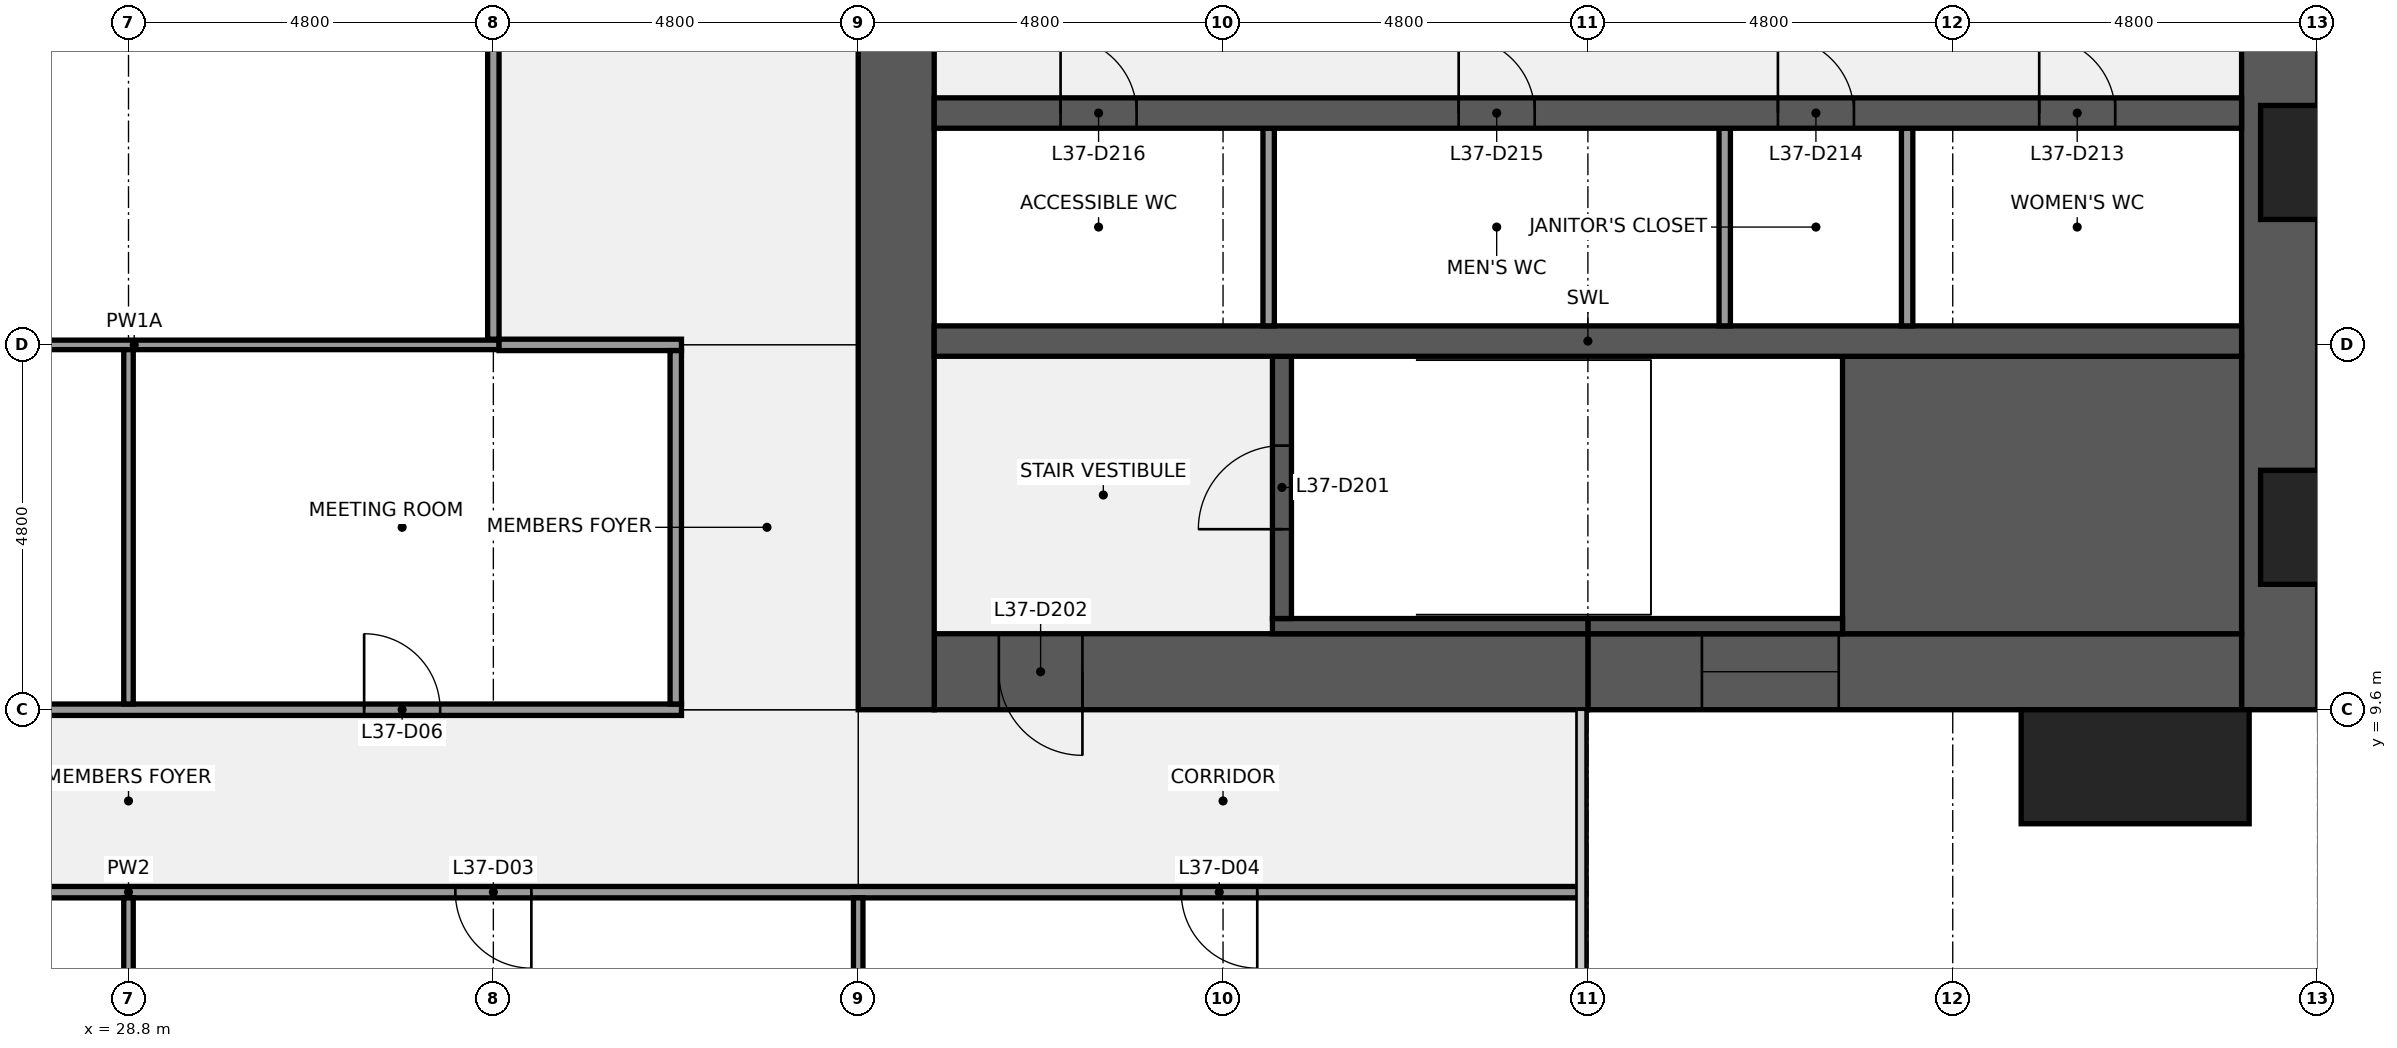
"""IFC4 building model, lengths in metres.
Left out: names, types, materials, properties, quantities, classifications, styles, units other than length and angle.
Written with IfcOpenShell. Run it as: python <this file> out.ifc"""

import sys

from ifc_helpers import new_model, si_unit, direction, frame, frame_2d, origin, origin_2d, place, context, subcontext, project, spatial, rectangle, extrude, element, fill, save


model = new_model("IFC4")
c1 = context("Model", 3, precision=1e-05, world=origin(), true_north=direction((0.0, 1.0)))
c2 = subcontext(c1, "Body", "Model", "MODEL_VIEW")
j1 = project(units=[si_unit("LENGTHUNIT", "METRE"), si_unit("PLANEANGLEUNIT", "RADIAN")], contexts=[c1])
p1 = place(None, origin())
s1 = spatial("IfcSite", under=j1, at=p1, CompositionType="ELEMENT")
p2 = place(p1, origin())
s2 = spatial("IfcBuilding", under=s1, at=p2, CompositionType="ELEMENT")
p3 = place(p2, frame((0.0, 0.0, 168.1)))
s3 = spatial("IfcBuildingStorey", under=s2, at=p3, CompositionType="ELEMENT", Elevation=168.1)
p4 = place(p3, frame((57.1, 38.4, 0.0), z_axis=(0.0, 0.0, 1.0), x_axis=(0.0, -1.0, 0.0)))
e1 = element("IfcWall", 1, at=p4, inside=s3, PredefinedType="SHEAR", context=c2, shape_type="SweptSolid", body=[
    extrude(rectangle(XDim=28.8, YDim=1.0, at=frame_2d((14.4, 0.0))), origin(), (0.0, 0.0, 1.0), 3.84),
])
p5 = place(p4, frame((18.45, 0.0, 0.9)))
e2 = element("IfcOpeningElement", 2, at=p5, cuts=e1, PredefinedType="OPENING", context=c2, shape_type="SweptSolid", body=[
    extrude(rectangle(XDim=1.5, YDim=1.5, at=frame_2d((0.75, 0.75))), frame((0.0, 0.51, 0.0), z_axis=(0.0, -1.0, 0.0), x_axis=(1.0, 0.0, 0.0)), (0.0, 0.0, 1.0), 1.02),
])
p6 = place(p4, frame((8.85, 0.0, 0.9)))
e3 = element("IfcOpeningElement", 3, at=p6, cuts=e1, PredefinedType="OPENING", context=c2, shape_type="SweptSolid", body=[
    extrude(rectangle(XDim=1.5, YDim=1.5, at=frame_2d((0.75, 0.75))), frame((0.0, 0.51, 0.0), z_axis=(0.0, -1.0, 0.0), x_axis=(1.0, 0.0, 0.0)), (0.0, 0.0, 1.0), 1.02),
])
p7 = place(p3, frame((56.6, 10.1, 0.0), z_axis=(0.0, 0.0, 1.0), x_axis=(-1.0, 0.0, 0.0)))
e4 = element("IfcWall", 4, at=p7, inside=s3, PredefinedType="SHEAR", context=c2, shape_type="SweptSolid", body=[
    extrude(rectangle(XDim=8.6, YDim=1.0, at=frame_2d((4.3, 0.0))), origin(), (0.0, 0.0, 1.0), 3.84),
])
p8 = place(p7, frame((5.3, 0.0, 0.9)))
e5 = element("IfcOpeningElement", 5, at=p8, cuts=e4, PredefinedType="OPENING", context=c2, shape_type="SweptSolid", body=[
    extrude(rectangle(XDim=1.8, YDim=1.5, at=frame_2d((0.9, 0.75))), frame((0.0, 0.51, 0.0), z_axis=(0.0, -1.0, 0.0), x_axis=(1.0, 0.0, 0.0)), (0.0, 0.0, 1.0), 1.02),
])
p9 = place(p3, frame((48.0, 10.1, 0.0), z_axis=(0.0, 0.0, 1.0), x_axis=(-1.0, 0.0, 0.0)))
e6 = element("IfcWall", 6, at=p9, inside=s3, PredefinedType="SHEAR", context=c2, shape_type="SweptSolid", body=[
    extrude(rectangle(XDim=8.6, YDim=1.0, at=frame_2d((4.3, 0.0))), origin(), (0.0, 0.0, 1.0), 3.84),
])
p10 = place(p9, frame((6.65, 0.0, 0.0)))
e7 = element("IfcOpeningElement", 7, at=p10, cuts=e6, PredefinedType="OPENING", context=c2, shape_type="SweptSolid", body=[
    extrude(rectangle(XDim=1.1, YDim=2.1, at=frame_2d((0.55, 1.05))), frame((0.0, 0.51, 0.0), z_axis=(0.0, -1.0, 0.0), x_axis=(1.0, 0.0, 0.0)), (0.0, 0.0, 1.0), 1.02),
])
p11 = place(p3, frame((38.9, 9.6, 0.0), z_axis=(0.0, 0.0, 1.0), x_axis=(0.0, 1.0, 0.0)))
e8 = element("IfcWall", 8, at=p11, inside=s3, PredefinedType="SHEAR", context=c2, shape_type="SweptSolid", body=[
    extrude(rectangle(XDim=28.8, YDim=1.0, at=frame_2d((14.4, 0.0))), origin(), (0.0, 0.0, 1.0), 3.84),
])
p12 = place(p11, frame((8.7, 0.0, 0.0)))
e9 = element("IfcOpeningElement", 9, at=p12, cuts=e8, PredefinedType="OPENING", context=c2, shape_type="SweptSolid", body=[
    extrude(rectangle(XDim=1.8, YDim=2.1, at=frame_2d((0.9, 1.05))), frame((0.0, 0.51, 0.0), z_axis=(0.0, -1.0, 0.0), x_axis=(1.0, 0.0, 0.0)), (0.0, 0.0, 1.0), 1.02),
])
p13 = place(p11, frame((18.3, 0.0, 0.0)))
e10 = element("IfcOpeningElement", 10, at=p13, cuts=e8, PredefinedType="OPENING", context=c2, shape_type="SweptSolid", body=[
    extrude(rectangle(XDim=1.8, YDim=2.1, at=frame_2d((0.9, 1.05))), frame((0.0, 0.51, 0.0), z_axis=(0.0, -1.0, 0.0), x_axis=(1.0, 0.0, 0.0)), (0.0, 0.0, 1.0), 1.02),
])
p14 = place(p3, frame((51.35, 12.425, 0.0), z_axis=(0.0, 0.0, 1.0), x_axis=(1.0, 0.0, 0.0)))
e11 = element("IfcWall", 11, at=p14, inside=s3, PredefinedType="SHEAR", context=c2, shape_type="SweptSolid", body=[
    extrude(rectangle(XDim=5.25, YDim=3.65, at=frame_2d((2.625, 0.0))), origin(), (0.0, 0.0, 1.0), 3.84),
])
p15 = place(p3, frame((48.0, 10.7, 0.0), z_axis=(0.0, 0.0, 1.0), x_axis=(1.0, 0.0, 0.0)))
e12 = element("IfcWall", 12, at=p15, inside=s3, PredefinedType="SHEAR", context=c2, shape_type="SweptSolid", body=[
    extrude(rectangle(XDim=3.35, YDim=0.2, at=frame_2d((1.675, 0.0))), origin(), (0.0, 0.0, 1.0), 3.84),
])
p16 = place(p3, frame((43.85, 10.7, 0.0), z_axis=(0.0, 0.0, 1.0), x_axis=(1.0, 0.0, 0.0)))
e13 = element("IfcWall", 13, at=p16, inside=s3, PredefinedType="SHEAR", context=c2, shape_type="SweptSolid", body=[
    extrude(rectangle(XDim=4.15, YDim=0.2, at=frame_2d((2.075, 0.0))), origin(), (0.0, 0.0, 1.0), 3.84),
])
p17 = place(p3, frame((43.975, 10.8, 0.0), z_axis=(0.0, 0.0, 1.0), x_axis=(0.0, 1.0, 0.0)))
e14 = element("IfcWall", 14, at=p17, inside=s3, PredefinedType="SHEAR", context=c2, shape_type="SweptSolid", body=[
    extrude(rectangle(XDim=3.45, YDim=0.25, at=frame_2d((1.725, 0.0))), origin(), (0.0, 0.0, 1.0), 3.84),
])
p18 = place(p17, frame((1.175, 0.0, 0.0)))
e15 = element("IfcOpeningElement", 15, at=p18, cuts=e14, PredefinedType="OPENING", context=c2, shape_type="SweptSolid", body=[
    extrude(rectangle(XDim=1.1, YDim=2.1, at=frame_2d((0.55, 1.05))), frame((0.0, 0.135, 0.0), z_axis=(0.0, -1.0, 0.0), x_axis=(1.0, 0.0, 0.0)), (0.0, 0.0, 1.0), 0.27),
])
p19 = place(p3, frame((39.4, 14.45, 0.0), z_axis=(0.0, 0.0, 1.0), x_axis=(1.0, 0.0, 0.0)))
e16 = element("IfcWall", 16, at=p19, inside=s3, PredefinedType="SHEAR", context=c2, shape_type="SweptSolid", body=[
    extrude(rectangle(XDim=17.2, YDim=0.4, at=frame_2d((8.6, 0.0))), origin(), (0.0, 0.0, 1.0), 3.84),
])
for number, where, z_axis, x_axis in (
    (17, (52.2, 14.65, 0.0), (0.0, 0.0, 1.0), (0.0, 1.0, 0.0)),
    (18, (49.8, 14.65, 0.0), (0.0, 0.0, 1.0), (0.0, 1.0, 0.0)),
    (19, (43.8, 14.65, 0.0), (0.0, 0.0, 1.0), (0.0, 1.0, 0.0)),
):
    element("IfcWall", number, at=place(p3, frame(where, z_axis=z_axis, x_axis=x_axis)), inside=s3, PredefinedType="PARTITIONING", context=c2, shape_type="SweptSolid", body=[
        extrude(rectangle(XDim=2.6, YDim=0.15, at=frame_2d((1.3, 0.0))), origin(), (0.0, 0.0, 1.0), 3.84),
    ])
p20 = place(p3, frame((39.4, 17.45, 0.0), z_axis=(0.0, 0.0, 1.0), x_axis=(1.0, 0.0, 0.0)))
e20 = element("IfcWall", 20, at=p20, inside=s3, PredefinedType="SHEAR", context=c2, shape_type="SweptSolid", body=[
    extrude(rectangle(XDim=17.2, YDim=0.4, at=frame_2d((8.6, 0.0))), origin(), (0.0, 0.0, 1.0), 3.84),
])
p21 = place(p20, frame((14.538, 0.0, 0.0)))
e21 = element("IfcOpeningElement", 21, at=p21, cuts=e20, PredefinedType="OPENING", context=c2, shape_type="SweptSolid", body=[
    extrude(rectangle(XDim=1.0, YDim=2.1, at=frame_2d((0.5, 1.05))), frame((0.0, 0.21, 0.0), z_axis=(0.0, -1.0, 0.0), x_axis=(1.0, 0.0, 0.0)), (0.0, 0.0, 1.0), 0.42),
])
p22 = place(p20, frame((11.1, 0.0, 0.0)))
e22 = element("IfcOpeningElement", 22, at=p22, cuts=e20, PredefinedType="OPENING", context=c2, shape_type="SweptSolid", body=[
    extrude(rectangle(XDim=1.0, YDim=2.1, at=frame_2d((0.5, 1.05))), frame((0.0, 0.21, 0.0), z_axis=(0.0, -1.0, 0.0), x_axis=(1.0, 0.0, 0.0)), (0.0, 0.0, 1.0), 0.42),
])
p23 = place(p20, frame((6.9, 0.0, 0.0)))
e23 = element("IfcOpeningElement", 23, at=p23, cuts=e20, PredefinedType="OPENING", context=c2, shape_type="SweptSolid", body=[
    extrude(rectangle(XDim=1.0, YDim=2.1, at=frame_2d((0.5, 1.05))), frame((0.0, 0.21, 0.0), z_axis=(0.0, -1.0, 0.0), x_axis=(1.0, 0.0, 0.0)), (0.0, 0.0, 1.0), 0.42),
])
p24 = place(p20, frame((1.663, 0.0, 0.0)))
e24 = element("IfcOpeningElement", 24, at=p24, cuts=e20, PredefinedType="OPENING", context=c2, shape_type="SweptSolid", body=[
    extrude(rectangle(XDim=1.0, YDim=2.1, at=frame_2d((0.5, 1.05))), frame((0.0, 0.21, 0.0), z_axis=(0.0, -1.0, 0.0), x_axis=(1.0, 0.0, 0.0)), (0.0, 0.0, 1.0), 0.42),
])
p25 = place(p3, frame((9.7, 7.2, 0.0), z_axis=(0.0, 0.0, 1.0), x_axis=(1.0, 0.0, 0.0)))
e25 = element("IfcWall", 25, at=p25, inside=s3, PredefinedType="PARTITIONING", context=c2, shape_type="SweptSolid", body=[
    extrude(rectangle(XDim=38.2, YDim=0.15, at=frame_2d((19.1, 0.0))), origin(), (0.0, 0.0, 1.0), 2.936),
])
p26 = place(p25, frame((4.25, 0.0, 0.0)))
e26 = element("IfcOpeningElement", 26, at=p26, cuts=e25, PredefinedType="OPENING", context=c2, shape_type="SweptSolid", body=[
    extrude(rectangle(XDim=1.0, YDim=2.1, at=frame_2d((0.5, 1.05))), frame((0.0, 0.085, 0.0), z_axis=(0.0, -1.0, 0.0), x_axis=(1.0, 0.0, 0.0)), (0.0, 0.0, 1.0), 0.17),
])
p27 = place(p25, frame((13.8, 0.0, 0.0)))
e27 = element("IfcOpeningElement", 27, at=p27, cuts=e25, PredefinedType="OPENING", context=c2, shape_type="SweptSolid", body=[
    extrude(rectangle(XDim=1.0, YDim=2.1, at=frame_2d((0.5, 1.05))), frame((0.0, 0.085, 0.0), z_axis=(0.0, -1.0, 0.0), x_axis=(1.0, 0.0, 0.0)), (0.0, 0.0, 1.0), 0.17),
])
p28 = place(p25, frame((23.4, 0.0, 0.0)))
e28 = element("IfcOpeningElement", 28, at=p28, cuts=e25, PredefinedType="OPENING", context=c2, shape_type="SweptSolid", body=[
    extrude(rectangle(XDim=1.0, YDim=2.1, at=frame_2d((0.5, 1.05))), frame((0.0, 0.085, 0.0), z_axis=(0.0, -1.0, 0.0), x_axis=(1.0, 0.0, 0.0)), (0.0, 0.0, 1.0), 0.17),
])
p29 = place(p25, frame((32.95, 0.0, 0.0)))
e29 = element("IfcOpeningElement", 29, at=p29, cuts=e25, PredefinedType="OPENING", context=c2, shape_type="SweptSolid", body=[
    extrude(rectangle(XDim=1.0, YDim=2.1, at=frame_2d((0.5, 1.05))), frame((0.0, 0.085, 0.0), z_axis=(0.0, -1.0, 0.0), x_axis=(1.0, 0.0, 0.0)), (0.0, 0.0, 1.0), 0.17),
])
p30 = place(p3, frame((21.525, 9.6, 0.0), z_axis=(0.0, 0.0, 1.0), x_axis=(1.0, 0.0, 0.0)))
e30 = element("IfcWall", 30, at=p30, inside=s3, PredefinedType="PARTITIONING", context=c2, shape_type="SweptSolid", body=[
    extrude(rectangle(XDim=14.55, YDim=0.15, at=frame_2d((7.275, 0.0))), origin(), (0.0, 0.0, 1.0), 2.936),
])
p31 = place(p30, frame((3.175, 0.0, 0.0)))
e31 = element("IfcOpeningElement", 31, at=p31, cuts=e30, PredefinedType="OPENING", context=c2, shape_type="SweptSolid", body=[
    extrude(rectangle(XDim=1.0, YDim=2.1, at=frame_2d((0.5, 1.05))), frame((0.0, 0.085, 0.0), z_axis=(0.0, -1.0, 0.0), x_axis=(1.0, 0.0, 0.0)), (0.0, 0.0, 1.0), 0.17),
])
p32 = place(p30, frame((10.375, 0.0, 0.0)))
e32 = element("IfcOpeningElement", 32, at=p32, cuts=e30, PredefinedType="OPENING", context=c2, shape_type="SweptSolid", body=[
    extrude(rectangle(XDim=1.0, YDim=2.1, at=frame_2d((0.5, 1.05))), frame((0.0, 0.085, 0.0), z_axis=(0.0, -1.0, 0.0), x_axis=(1.0, 0.0, 0.0)), (0.0, 0.0, 1.0), 0.17),
])
p33 = place(p3, frame((24.075, 14.4, 0.0), z_axis=(0.0, 0.0, 1.0), x_axis=(1.0, 0.0, 0.0)))
e33 = element("IfcWall", 33, at=p33, inside=s3, PredefinedType="PARTITIONING", context=c2, shape_type="SweptSolid", body=[
    extrude(rectangle(XDim=9.6, YDim=0.125, at=frame_2d((4.8, 0.0))), origin(), (0.0, 0.0, 1.0), 2.936),
])
p34 = place(p3, frame((33.675, 14.4, 0.0), z_axis=(0.0, 0.0, 1.0), x_axis=(1.0, 0.0, 0.0)))
e34 = element("IfcWall", 34, at=p34, inside=s3, PredefinedType="PARTITIONING", context=c2, shape_type="SweptSolid", body=[
    extrude(rectangle(XDim=2.4, YDim=0.15, at=frame_2d((1.2, 0.0))), origin(), (0.0, 0.0, 1.0), 2.936),
])
p35 = place(p3, frame((28.8, 0.6, 0.0), z_axis=(0.0, 0.0, 1.0), x_axis=(0.0, 1.0, 0.0)))
e35 = element("IfcWall", 35, at=p35, inside=s3, PredefinedType="PARTITIONING", context=c2, shape_type="SweptSolid", body=[
    extrude(rectangle(XDim=6.525, YDim=0.125, at=frame_2d((3.262, 0.0))), origin(), (0.0, 0.0, 1.0), 2.936),
])
p36 = place(p3, frame((28.8, 9.675, 0.0), z_axis=(0.0, 0.0, 1.0), x_axis=(0.0, 1.0, 0.0)))
e36 = element("IfcWall", 36, at=p36, inside=s3, PredefinedType="PARTITIONING", context=c2, shape_type="SweptSolid", body=[
    extrude(rectangle(XDim=4.662, YDim=0.125, at=frame_2d((2.331, 0.0))), origin(), (0.0, 0.0, 1.0), 2.936),
])
p37 = place(p3, frame((33.6, 14.475, 0.0), z_axis=(0.0, 0.0, 1.0), x_axis=(0.0, 1.0, 0.0)))
e37 = element("IfcWall", 37, at=p37, inside=s3, PredefinedType="PARTITIONING", context=c2, shape_type="SweptSolid", body=[
    extrude(rectangle(XDim=13.05, YDim=0.15, at=frame_2d((6.525, 0.0))), origin(), (0.0, 0.0, 1.0), 2.936),
])
p38 = place(p3, frame((36.0, 9.675, 0.0), z_axis=(0.0, 0.0, 1.0), x_axis=(0.0, 1.0, 0.0)))
e38 = element("IfcWall", 38, at=p38, inside=s3, PredefinedType="PARTITIONING", context=c2, shape_type="SweptSolid", body=[
    extrude(rectangle(XDim=4.65, YDim=0.15, at=frame_2d((2.325, 0.0))), origin(), (0.0, 0.0, 1.0), 2.936),
])
p39 = place(p3, frame((38.4, 0.6, 0.0), z_axis=(0.0, 0.0, 1.0), x_axis=(0.0, 1.0, 0.0)))
e39 = element("IfcWall", 39, at=p39, inside=s3, PredefinedType="PARTITIONING", context=c2, shape_type="SweptSolid", body=[
    extrude(rectangle(XDim=6.525, YDim=0.125, at=frame_2d((3.262, 0.0))), origin(), (0.0, 0.0, 1.0), 2.936),
])
p40 = place(p3, frame((55.2, 8.85, 0.0), z_axis=(0.0, 0.0, 1.0), x_axis=(1.0, 0.0, 0.0)))
e40 = element("IfcColumn", 40, at=p40, inside=s3, PredefinedType="PILASTER", context=c2, shape_type="SweptSolid", body=[
    extrude(rectangle(XDim=3.0, YDim=1.5, at=origin_2d()), origin(), (0.0, 0.0, 1.0), 4.0),
])
p41 = place(p18, origin())
e41 = element("IfcDoor", 41, at=p41, inside=s3, OperationType="SINGLE_SWING_LEFT", PredefinedType="DOOR", context=c2, shape_type="SweptSolid", body=[
    extrude(rectangle(XDim=1.1, YDim=2.1, at=frame_2d((0.55, 1.05))), frame((0.0, 0.025, 0.0), z_axis=(0.0, -1.0, 0.0), x_axis=(1.0, 0.0, 0.0)), (0.0, 0.0, 1.0), 0.05),
])
fill(e15, e41)
p42 = place(p10, origin())
e42 = element("IfcDoor", 42, at=p42, inside=s3, OperationType="SINGLE_SWING_LEFT", PredefinedType="DOOR", context=c2, shape_type="SweptSolid", body=[
    extrude(rectangle(XDim=1.1, YDim=2.1, at=frame_2d((0.55, 1.05))), frame((0.0, 0.025, 0.0), z_axis=(0.0, -1.0, 0.0), x_axis=(1.0, 0.0, 0.0)), (0.0, 0.0, 1.0), 0.05),
])
fill(e7, e42)
p43 = place(p21, origin())
e43 = element("IfcDoor", 43, at=p43, inside=s3, OperationType="SINGLE_SWING_LEFT", PredefinedType="DOOR", context=c2, shape_type="SweptSolid", body=[
    extrude(rectangle(XDim=1.0, YDim=2.1, at=frame_2d((0.5, 1.05))), frame((0.0, 0.025, 0.0), z_axis=(0.0, -1.0, 0.0), x_axis=(1.0, 0.0, 0.0)), (0.0, 0.0, 1.0), 0.05),
])
fill(e21, e43)
p44 = place(p22, origin())
e44 = element("IfcDoor", 44, at=p44, inside=s3, OperationType="SINGLE_SWING_LEFT", PredefinedType="DOOR", context=c2, shape_type="SweptSolid", body=[
    extrude(rectangle(XDim=1.0, YDim=2.1, at=frame_2d((0.5, 1.05))), frame((0.0, 0.025, 0.0), z_axis=(0.0, -1.0, 0.0), x_axis=(1.0, 0.0, 0.0)), (0.0, 0.0, 1.0), 0.05),
])
fill(e22, e44)
p45 = place(p23, origin())
e45 = element("IfcDoor", 45, at=p45, inside=s3, OperationType="SINGLE_SWING_LEFT", PredefinedType="DOOR", context=c2, shape_type="SweptSolid", body=[
    extrude(rectangle(XDim=1.0, YDim=2.1, at=frame_2d((0.5, 1.05))), frame((0.0, 0.025, 0.0), z_axis=(0.0, -1.0, 0.0), x_axis=(1.0, 0.0, 0.0)), (0.0, 0.0, 1.0), 0.05),
])
fill(e23, e45)
p46 = place(p24, origin())
e46 = element("IfcDoor", 46, at=p46, inside=s3, OperationType="SINGLE_SWING_LEFT", PredefinedType="DOOR", context=c2, shape_type="SweptSolid", body=[
    extrude(rectangle(XDim=1.0, YDim=2.1, at=frame_2d((0.5, 1.05))), frame((0.0, 0.025, 0.0), z_axis=(0.0, -1.0, 0.0), x_axis=(1.0, 0.0, 0.0)), (0.0, 0.0, 1.0), 0.05),
])
fill(e24, e46)
p47 = place(p8, origin())
e47 = element("IfcWindow", 47, at=p47, inside=s3, PartitioningType="SINGLE_PANEL", PredefinedType="WINDOW", context=c2, shape_type="SweptSolid", body=[
    extrude(rectangle(XDim=1.8, YDim=1.5, at=frame_2d((0.9, 0.75))), frame((0.0, 0.03, 0.0), z_axis=(0.0, -1.0, 0.0), x_axis=(1.0, 0.0, 0.0)), (0.0, 0.0, 1.0), 0.06),
])
fill(e5, e47)
p48 = place(p28, origin())
e48 = element("IfcDoor", 48, at=p48, inside=s3, OperationType="SINGLE_SWING_RIGHT", PredefinedType="DOOR", context=c2, shape_type="SweptSolid", body=[
    extrude(rectangle(XDim=1.0, YDim=2.1, at=frame_2d((0.5, 1.05))), frame((0.0, 0.025, 0.0), z_axis=(0.0, -1.0, 0.0), x_axis=(1.0, 0.0, 0.0)), (0.0, 0.0, 1.0), 0.05),
])
fill(e28, e48)
p49 = place(p29, origin())
e49 = element("IfcDoor", 49, at=p49, inside=s3, OperationType="SINGLE_SWING_RIGHT", PredefinedType="DOOR", context=c2, shape_type="SweptSolid", body=[
    extrude(rectangle(XDim=1.0, YDim=2.1, at=frame_2d((0.5, 1.05))), frame((0.0, 0.025, 0.0), z_axis=(0.0, -1.0, 0.0), x_axis=(1.0, 0.0, 0.0)), (0.0, 0.0, 1.0), 0.05),
])
fill(e29, e49)
p50 = place(p32, origin())
e50 = element("IfcDoor", 50, at=p50, inside=s3, OperationType="SINGLE_SWING_LEFT", PredefinedType="DOOR", context=c2, shape_type="SweptSolid", body=[
    extrude(rectangle(XDim=1.0, YDim=2.1, at=frame_2d((0.5, 1.05))), frame((0.0, 0.025, 0.0), z_axis=(0.0, -1.0, 0.0), x_axis=(1.0, 0.0, 0.0)), (0.0, 0.0, 1.0), 0.05),
])
fill(e32, e50)
save(model, sys.argv[1])
